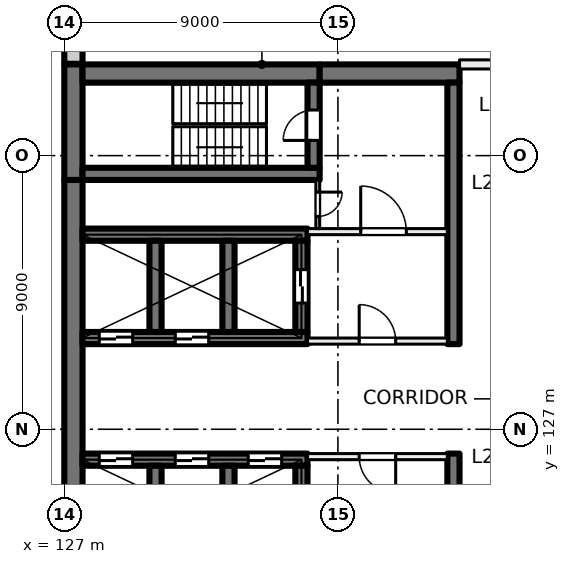
"""IFC4 building model, lengths in metres.
Left out: names, types, materials, properties, quantities, classifications, styles, units other than length and angle.
Written with IfcOpenShell. Run it as: python <this file> out.ifc"""

import sys

from ifc_helpers import new_model, si_unit, direction, frame, frame_2d, origin, place, context, subcontext, project, spatial, rectangle, extrude, element, fill, save


model = new_model("IFC4")
c1 = context("Model", 3, precision=1e-05, world=origin(), true_north=direction((0.0, 1.0)))
c2 = subcontext(c1, "Body", "Model", "MODEL_VIEW")
j1 = project(units=[si_unit("LENGTHUNIT", "METRE"), si_unit("PLANEANGLEUNIT", "RADIAN")], contexts=[c1])
p1 = place(None, origin())
s1 = spatial("IfcSite", under=j1, at=p1, CompositionType="ELEMENT")
p2 = place(p1, origin())
s2 = spatial("IfcBuilding", under=s1, at=p2, CompositionType="ELEMENT")
p3 = place(p2, frame((0.0, 0.0, 89.0)))
s3 = spatial("IfcBuildingStorey", under=s2, at=p3, CompositionType="ELEMENT", Elevation=89.0)
p4 = place(p3, frame((127.3, 120.8, 0.0), z_axis=(0.0, 0.0, 1.0), x_axis=(0.0, 1.0, 0.0)))
e1 = element("IfcWall", 1, at=p4, inside=s3, PredefinedType="SHEAR", context=c2, shape_type="SweptSolid", body=[
    extrude(rectangle(XDim=14.4, YDim=0.6, at=frame_2d((7.2, 0.0))), origin(), (0.0, 0.0, 1.0), 4.0),
])
p5 = place(p3, frame((127.3, 135.2, 0.0), z_axis=(0.0, 0.0, 1.0), x_axis=(0.0, 1.0, 0.0)))
e2 = element("IfcWall", 2, at=p5, inside=s3, PredefinedType="SHEAR", context=c2, shape_type="SweptSolid", body=[
    extrude(rectangle(XDim=3.8, YDim=0.6, at=frame_2d((1.9, 0.0))), origin(), (0.0, 0.0, 1.0), 4.0),
])
p6 = place(p3, frame((127.6, 138.7, 0.0), z_axis=(0.0, 0.0, 1.0), x_axis=(1.0, 0.0, 0.0)))
e3 = element("IfcWall", 3, at=p6, inside=s3, PredefinedType="SHEAR", context=c2, shape_type="SweptSolid", body=[
    extrude(rectangle(XDim=7.8, YDim=0.6, at=frame_2d((3.9, 0.0))), origin(), (0.0, 0.0, 1.0), 4.0),
])
p7 = place(p3, frame((135.4, 138.7, 0.0), z_axis=(0.0, 0.0, 1.0), x_axis=(1.0, 0.0, 0.0)))
e4 = element("IfcWall", 4, at=p7, inside=s3, PredefinedType="SHEAR", context=c2, shape_type="SweptSolid", body=[
    extrude(rectangle(XDim=4.6, YDim=0.6, at=frame_2d((2.3, 0.0))), origin(), (0.0, 0.0, 1.0), 4.0),
])
p8 = place(p3, frame((127.6, 135.4, 0.0), z_axis=(0.0, 0.0, 1.0), x_axis=(1.0, 0.0, 0.0)))
e5 = element("IfcWall", 5, at=p8, inside=s3, PredefinedType="SHEAR", context=c2, shape_type="SweptSolid", body=[
    extrude(rectangle(XDim=7.8, YDim=0.4, at=frame_2d((3.9, 0.0))), origin(), (0.0, 0.0, 1.0), 4.0),
])
p9 = place(p3, frame((135.2, 135.6, 0.0), z_axis=(0.0, 0.0, 1.0), x_axis=(0.0, 1.0, 0.0)))
e6 = element("IfcWall", 6, at=p9, inside=s3, PredefinedType="SHEAR", context=c2, shape_type="SweptSolid", body=[
    extrude(rectangle(XDim=2.8, YDim=0.4, at=frame_2d((1.4, 0.0))), origin(), (0.0, 0.0, 1.0), 4.0),
])
p10 = place(p9, frame((0.9, 0.0, 0.0)))
e7 = element("IfcOpeningElement", 7, at=p10, cuts=e6, PredefinedType="OPENING", context=c2, shape_type="SweptSolid", body=[
    extrude(rectangle(XDim=1.0, YDim=2.1, at=frame_2d((0.5, 1.05))), frame((0.0, 0.21, 0.0), z_axis=(0.0, -1.0, 0.0), x_axis=(1.0, 0.0, 0.0)), (0.0, 0.0, 1.0), 0.42),
])
p11 = place(p3, frame((127.6, 126.0, 0.0), z_axis=(0.0, 0.0, 1.0), x_axis=(1.0, 0.0, 0.0)))
e8 = element("IfcWall", 8, at=p11, inside=s3, PredefinedType="SHEAR", context=c2, shape_type="SweptSolid", body=[
    extrude(rectangle(XDim=7.4, YDim=0.4, at=frame_2d((3.7, 0.0))), origin(), (0.0, 0.0, 1.0), 4.0),
])
p12 = place(p11, frame((0.55, 0.0, 0.0)))
e9 = element("IfcOpeningElement", 9, at=p12, cuts=e8, PredefinedType="OPENING", context=c2, shape_type="SweptSolid", body=[
    extrude(rectangle(XDim=1.1, YDim=2.1, at=frame_2d((0.55, 1.05))), frame((0.0, 0.21, 0.0), z_axis=(0.0, -1.0, 0.0), x_axis=(1.0, 0.0, 0.0)), (0.0, 0.0, 1.0), 0.42),
])
p13 = place(p11, frame((3.05, 0.0, 0.0)))
e10 = element("IfcOpeningElement", 10, at=p13, cuts=e8, PredefinedType="OPENING", context=c2, shape_type="SweptSolid", body=[
    extrude(rectangle(XDim=1.1, YDim=2.1, at=frame_2d((0.55, 1.05))), frame((0.0, 0.21, 0.0), z_axis=(0.0, -1.0, 0.0), x_axis=(1.0, 0.0, 0.0)), (0.0, 0.0, 1.0), 0.42),
])
p14 = place(p11, frame((5.45, 0.0, 0.0)))
e11 = element("IfcOpeningElement", 11, at=p14, cuts=e8, PredefinedType="OPENING", context=c2, shape_type="SweptSolid", body=[
    extrude(rectangle(XDim=1.1, YDim=2.1, at=frame_2d((0.55, 1.05))), frame((0.0, 0.21, 0.0), z_axis=(0.0, -1.0, 0.0), x_axis=(1.0, 0.0, 0.0)), (0.0, 0.0, 1.0), 0.42),
])
for number, where, z_axis, x_axis in (
    (12, (130.0, 122.8, 0.0), (0.0, 0.0, 1.0), (0.0, 1.0, 0.0)),
    (13, (132.4, 122.8, 0.0), (0.0, 0.0, 1.0), (0.0, 1.0, 0.0)),
    (14, (134.8, 122.8, 0.0), (0.0, 0.0, 1.0), (0.0, 1.0, 0.0)),
):
    element("IfcWall", number, at=place(p3, frame(where, z_axis=z_axis, x_axis=x_axis)), inside=s3, PredefinedType="SHEAR", context=c2, shape_type="SweptSolid", body=[
        extrude(rectangle(XDim=3.0, YDim=0.4, at=frame_2d((1.5, 0.0))), origin(), (0.0, 0.0, 1.0), 4.0),
    ])
p15 = place(p3, frame((127.6, 130.0, 0.0), z_axis=(0.0, 0.0, 1.0), x_axis=(1.0, 0.0, 0.0)))
e15 = element("IfcWall", 15, at=p15, inside=s3, PredefinedType="SHEAR", context=c2, shape_type="SweptSolid", body=[
    extrude(rectangle(XDim=7.4, YDim=0.4, at=frame_2d((3.7, 0.0))), origin(), (0.0, 0.0, 1.0), 4.0),
])
p16 = place(p15, frame((0.55, 0.0, 0.0)))
e16 = element("IfcOpeningElement", 16, at=p16, cuts=e15, PredefinedType="OPENING", context=c2, shape_type="SweptSolid", body=[
    extrude(rectangle(XDim=1.1, YDim=2.1, at=frame_2d((0.55, 1.05))), frame((0.0, 0.21, 0.0), z_axis=(0.0, -1.0, 0.0), x_axis=(1.0, 0.0, 0.0)), (0.0, 0.0, 1.0), 0.42),
])
p17 = place(p15, frame((3.05, 0.0, 0.0)))
e17 = element("IfcOpeningElement", 17, at=p17, cuts=e15, PredefinedType="OPENING", context=c2, shape_type="SweptSolid", body=[
    extrude(rectangle(XDim=1.1, YDim=2.1, at=frame_2d((0.55, 1.05))), frame((0.0, 0.21, 0.0), z_axis=(0.0, -1.0, 0.0), x_axis=(1.0, 0.0, 0.0)), (0.0, 0.0, 1.0), 0.42),
])
p18 = place(p3, frame((127.6, 133.4, 0.0), z_axis=(0.0, 0.0, 1.0), x_axis=(1.0, 0.0, 0.0)))
e18 = element("IfcWall", 18, at=p18, inside=s3, PredefinedType="SHEAR", context=c2, shape_type="SweptSolid", body=[
    extrude(rectangle(XDim=7.4, YDim=0.4, at=frame_2d((3.7, 0.0))), origin(), (0.0, 0.0, 1.0), 4.0),
])
for number, where, z_axis, x_axis in (
    (19, (130.0, 130.2, 0.0), (0.0, 0.0, 1.0), (0.0, 1.0, 0.0)),
    (20, (132.4, 130.2, 0.0), (0.0, 0.0, 1.0), (0.0, 1.0, 0.0)),
):
    element("IfcWall", number, at=place(p3, frame(where, z_axis=z_axis, x_axis=x_axis)), inside=s3, PredefinedType="SHEAR", context=c2, shape_type="SweptSolid", body=[
        extrude(rectangle(XDim=3.0, YDim=0.4, at=frame_2d((1.5, 0.0))), origin(), (0.0, 0.0, 1.0), 4.0),
    ])
p19 = place(p3, frame((134.8, 130.2, 0.0), z_axis=(0.0, 0.0, 1.0), x_axis=(0.0, 1.0, 0.0)))
e21 = element("IfcWall", 21, at=p19, inside=s3, PredefinedType="SHEAR", context=c2, shape_type="SweptSolid", body=[
    extrude(rectangle(XDim=3.0, YDim=0.4, at=frame_2d((1.5, 0.0))), origin(), (0.0, 0.0, 1.0), 4.0),
])
p20 = place(p19, frame((0.95, 0.0, 0.0)))
e22 = element("IfcOpeningElement", 22, at=p20, cuts=e21, PredefinedType="OPENING", context=c2, shape_type="SweptSolid", body=[
    extrude(rectangle(XDim=1.1, YDim=2.1, at=frame_2d((0.55, 1.05))), frame((0.0, 0.21, 0.0), z_axis=(0.0, -1.0, 0.0), x_axis=(1.0, 0.0, 0.0)), (0.0, 0.0, 1.0), 0.42),
])
for number, where, z_axis, x_axis in (
    (23, (139.8, 117.6, 0.0), (0.0, 0.0, 1.0), (0.0, 1.0, 0.0)),
    (24, (139.8, 129.8, 0.0), (0.0, 0.0, 1.0), (0.0, 1.0, 0.0)),
):
    element("IfcWall", number, at=place(p3, frame(where, z_axis=z_axis, x_axis=x_axis)), inside=s3, PredefinedType="SHEAR", context=c2, shape_type="SweptSolid", body=[
        extrude(rectangle(XDim=8.6, YDim=0.4, at=frame_2d((4.3, 0.0))), origin(), (0.0, 0.0, 1.0), 4.0),
    ])
p21 = place(p3, frame((127.3, 139.02, 0.0), z_axis=(0.0, 0.0, 1.0), x_axis=(0.0, 1.0, 0.0)))
e25 = element("IfcWall", 25, at=p21, inside=s3, PredefinedType="SOLIDWALL", context=c2, shape_type="SweptSolid", body=[
    extrude(rectangle(XDim=2.98, YDim=0.6, at=frame_2d((1.49, 0.0))), origin(), (0.0, 0.0, 1.0), 3.625),
])
p22 = place(p3, frame((135.0, 129.9, 0.0), z_axis=(0.0, 0.0, 1.0), x_axis=(1.0, 0.0, 0.0)))
e26 = element("IfcWall", 26, at=p22, inside=s3, PredefinedType="PARTITIONING", context=c2, shape_type="SweptSolid", body=[
    extrude(rectangle(XDim=4.6, YDim=0.2, at=frame_2d((2.3, 0.0))), origin(), (0.0, 0.0, 1.0), 3.625),
])
p23 = place(p22, frame((1.7, 0.0, 0.0)))
e27 = element("IfcOpeningElement", 27, at=p23, cuts=e26, PredefinedType="OPENING", context=c2, shape_type="SweptSolid", body=[
    extrude(rectangle(XDim=1.2, YDim=2.1, at=frame_2d((0.6, 1.05))), frame((0.0, 0.11, 0.0), z_axis=(0.0, -1.0, 0.0), x_axis=(1.0, 0.0, 0.0)), (0.0, 0.0, 1.0), 0.22),
])
p24 = place(p3, frame((135.0, 133.5, 0.0), z_axis=(0.0, 0.0, 1.0), x_axis=(1.0, 0.0, 0.0)))
e28 = element("IfcWall", 28, at=p24, inside=s3, PredefinedType="PARTITIONING", context=c2, shape_type="SweptSolid", body=[
    extrude(rectangle(XDim=4.6, YDim=0.2, at=frame_2d((2.3, 0.0))), origin(), (0.0, 0.0, 1.0), 3.625),
])
p25 = place(p24, frame((1.75, 0.0, 0.0)))
e29 = element("IfcOpeningElement", 29, at=p25, cuts=e28, PredefinedType="OPENING", context=c2, shape_type="SweptSolid", body=[
    extrude(rectangle(XDim=1.5, YDim=2.1, at=frame_2d((0.75, 1.05))), frame((0.0, 0.11, 0.0), z_axis=(0.0, -1.0, 0.0), x_axis=(1.0, 0.0, 0.0)), (0.0, 0.0, 1.0), 0.22),
])
p26 = place(p3, frame((135.337, 135.2, 0.0), z_axis=(0.0, 0.0, 1.0), x_axis=(0.0, -1.0, 0.0)))
e30 = element("IfcWall", 30, at=p26, inside=s3, PredefinedType="PARTITIONING", context=c2, shape_type="SweptSolid", body=[
    extrude(rectangle(XDim=1.6, YDim=0.125, at=frame_2d((0.8, 0.0))), origin(), (0.0, 0.0, 1.0), 3.625),
])
p27 = place(p26, frame((0.4, 0.0, 0.0)))
e31 = element("IfcOpeningElement", 31, at=p27, cuts=e30, PredefinedType="OPENING", context=c2, shape_type="SweptSolid", body=[
    extrude(rectangle(XDim=0.8, YDim=2.1, at=frame_2d((0.4, 1.05))), frame((0.0, 0.073, 0.0), z_axis=(0.0, -1.0, 0.0), x_axis=(1.0, 0.0, 0.0)), (0.0, 0.0, 1.0), 0.145),
])
p28 = place(p3, frame((139.6, 126.1, 0.0), z_axis=(0.0, 0.0, 1.0), x_axis=(-1.0, 0.0, 0.0)))
e32 = element("IfcWall", 32, at=p28, inside=s3, PredefinedType="PARTITIONING", context=c2, shape_type="SweptSolid", body=[
    extrude(rectangle(XDim=4.6, YDim=0.2, at=frame_2d((2.3, 0.0))), origin(), (0.0, 0.0, 1.0), 3.625),
])
p29 = place(p28, frame((1.7, 0.0, 0.0)))
e33 = element("IfcOpeningElement", 33, at=p29, cuts=e32, PredefinedType="OPENING", context=c2, shape_type="SweptSolid", body=[
    extrude(rectangle(XDim=1.2, YDim=2.1, at=frame_2d((0.6, 1.05))), frame((0.0, 0.11, 0.0), z_axis=(0.0, -1.0, 0.0), x_axis=(1.0, 0.0, 0.0)), (0.0, 0.0, 1.0), 0.22),
])
p30 = place(p3, frame((140.0, 139.0, 0.0), z_axis=(0.0, 0.0, 1.0), x_axis=(1.0, 0.0, 0.0)))
e34 = element("IfcWall", 34, at=p30, inside=s3, PredefinedType="PARTITIONING", context=c2, shape_type="SweptSolid", body=[
    extrude(rectangle(XDim=4.35, YDim=0.3, at=frame_2d((2.175, 0.0))), origin(), (0.0, 0.0, 1.0), 3.625),
])
p31 = place(p30, frame((1.283, 0.0, 0.0)))
e35 = element("IfcOpeningElement", 35, at=p31, cuts=e34, PredefinedType="OPENING", context=c2, shape_type="SweptSolid", body=[
    extrude(rectangle(XDim=1.8, YDim=2.1, at=frame_2d((0.9, 1.05))), frame((0.0, 0.16, 0.0), z_axis=(0.0, -1.0, 0.0), x_axis=(1.0, 0.0, 0.0)), (0.0, 0.0, 1.0), 0.32),
])
p32 = place(p16, origin())
e36 = element("IfcDoor", 36, at=p32, inside=s3, OperationType="DOUBLE_DOOR_SLIDING", PredefinedType="DOOR", context=c2, shape_type="SweptSolid", body=[
    extrude(rectangle(XDim=1.1, YDim=2.1, at=frame_2d((0.55, 1.05))), frame((0.0, 0.025, 0.0), z_axis=(0.0, -1.0, 0.0), x_axis=(1.0, 0.0, 0.0)), (0.0, 0.0, 1.0), 0.05),
])
fill(e16, e36)
p33 = place(p17, origin())
e37 = element("IfcDoor", 37, at=p33, inside=s3, OperationType="DOUBLE_DOOR_SLIDING", PredefinedType="DOOR", context=c2, shape_type="SweptSolid", body=[
    extrude(rectangle(XDim=1.1, YDim=2.1, at=frame_2d((0.55, 1.05))), frame((0.0, 0.025, 0.0), z_axis=(0.0, -1.0, 0.0), x_axis=(1.0, 0.0, 0.0)), (0.0, 0.0, 1.0), 0.05),
])
fill(e17, e37)
p34 = place(p12, origin())
e38 = element("IfcDoor", 38, at=p34, inside=s3, OperationType="DOUBLE_DOOR_SLIDING", PredefinedType="DOOR", context=c2, shape_type="SweptSolid", body=[
    extrude(rectangle(XDim=1.1, YDim=2.1, at=frame_2d((0.55, 1.05))), frame((0.0, 0.025, 0.0), z_axis=(0.0, -1.0, 0.0), x_axis=(1.0, 0.0, 0.0)), (0.0, 0.0, 1.0), 0.05),
])
fill(e9, e38)
p35 = place(p13, origin())
e39 = element("IfcDoor", 39, at=p35, inside=s3, OperationType="DOUBLE_DOOR_SLIDING", PredefinedType="DOOR", context=c2, shape_type="SweptSolid", body=[
    extrude(rectangle(XDim=1.1, YDim=2.1, at=frame_2d((0.55, 1.05))), frame((0.0, 0.025, 0.0), z_axis=(0.0, -1.0, 0.0), x_axis=(1.0, 0.0, 0.0)), (0.0, 0.0, 1.0), 0.05),
])
fill(e10, e39)
p36 = place(p14, origin())
e40 = element("IfcDoor", 40, at=p36, inside=s3, OperationType="DOUBLE_DOOR_SLIDING", PredefinedType="DOOR", context=c2, shape_type="SweptSolid", body=[
    extrude(rectangle(XDim=1.1, YDim=2.1, at=frame_2d((0.55, 1.05))), frame((0.0, 0.025, 0.0), z_axis=(0.0, -1.0, 0.0), x_axis=(1.0, 0.0, 0.0)), (0.0, 0.0, 1.0), 0.05),
])
fill(e11, e40)
p37 = place(p23, origin())
e41 = element("IfcDoor", 41, at=p37, inside=s3, OperationType="DOUBLE_DOOR_SINGLE_SWING", PredefinedType="DOOR", context=c2, shape_type="SweptSolid", body=[
    extrude(rectangle(XDim=1.2, YDim=2.1, at=frame_2d((0.6, 1.05))), frame((0.0, 0.025, 0.0), z_axis=(0.0, -1.0, 0.0), x_axis=(1.0, 0.0, 0.0)), (0.0, 0.0, 1.0), 0.05),
])
fill(e27, e41)
p38 = place(p25, origin())
e42 = element("IfcDoor", 42, at=p38, inside=s3, OperationType="DOUBLE_DOOR_SINGLE_SWING", PredefinedType="DOOR", context=c2, shape_type="SweptSolid", body=[
    extrude(rectangle(XDim=1.5, YDim=2.1, at=frame_2d((0.75, 1.05))), frame((0.0, 0.025, 0.0), z_axis=(0.0, -1.0, 0.0), x_axis=(1.0, 0.0, 0.0)), (0.0, 0.0, 1.0), 0.05),
])
fill(e29, e42)
p39 = place(p10, origin())
e43 = element("IfcDoor", 43, at=p39, inside=s3, OperationType="SINGLE_SWING_LEFT", PredefinedType="DOOR", context=c2, shape_type="SweptSolid", body=[
    extrude(rectangle(XDim=1.0, YDim=2.1, at=frame_2d((0.5, 1.05))), frame((0.0, 0.025, 0.0), z_axis=(0.0, -1.0, 0.0), x_axis=(1.0, 0.0, 0.0)), (0.0, 0.0, 1.0), 0.05),
])
fill(e7, e43)
p40 = place(p27, origin())
e44 = element("IfcDoor", 44, at=p40, inside=s3, OperationType="SINGLE_SWING_RIGHT", PredefinedType="DOOR", context=c2, shape_type="SweptSolid", body=[
    extrude(rectangle(XDim=0.8, YDim=2.1, at=frame_2d((0.4, 1.05))), frame((0.0, 0.025, 0.0), z_axis=(0.0, -1.0, 0.0), x_axis=(1.0, 0.0, 0.0)), (0.0, 0.0, 1.0), 0.05),
])
fill(e31, e44)
p41 = place(p29, origin())
e45 = element("IfcDoor", 45, at=p41, inside=s3, OperationType="DOUBLE_DOOR_SINGLE_SWING", PredefinedType="DOOR", context=c2, shape_type="SweptSolid", body=[
    extrude(rectangle(XDim=1.2, YDim=2.1, at=frame_2d((0.6, 1.05))), frame((0.0, 0.025, 0.0), z_axis=(0.0, -1.0, 0.0), x_axis=(1.0, 0.0, 0.0)), (0.0, 0.0, 1.0), 0.05),
])
fill(e33, e45)
p42 = place(p20, origin())
e46 = element("IfcDoor", 46, at=p42, inside=s3, OperationType="DOUBLE_DOOR_SLIDING", PredefinedType="DOOR", context=c2, shape_type="SweptSolid", body=[
    extrude(rectangle(XDim=1.1, YDim=2.1, at=frame_2d((0.55, 1.05))), frame((0.0, 0.025, 0.0), z_axis=(0.0, -1.0, 0.0), x_axis=(1.0, 0.0, 0.0)), (0.0, 0.0, 1.0), 0.05),
])
fill(e22, e46)
save(model, sys.argv[1])
